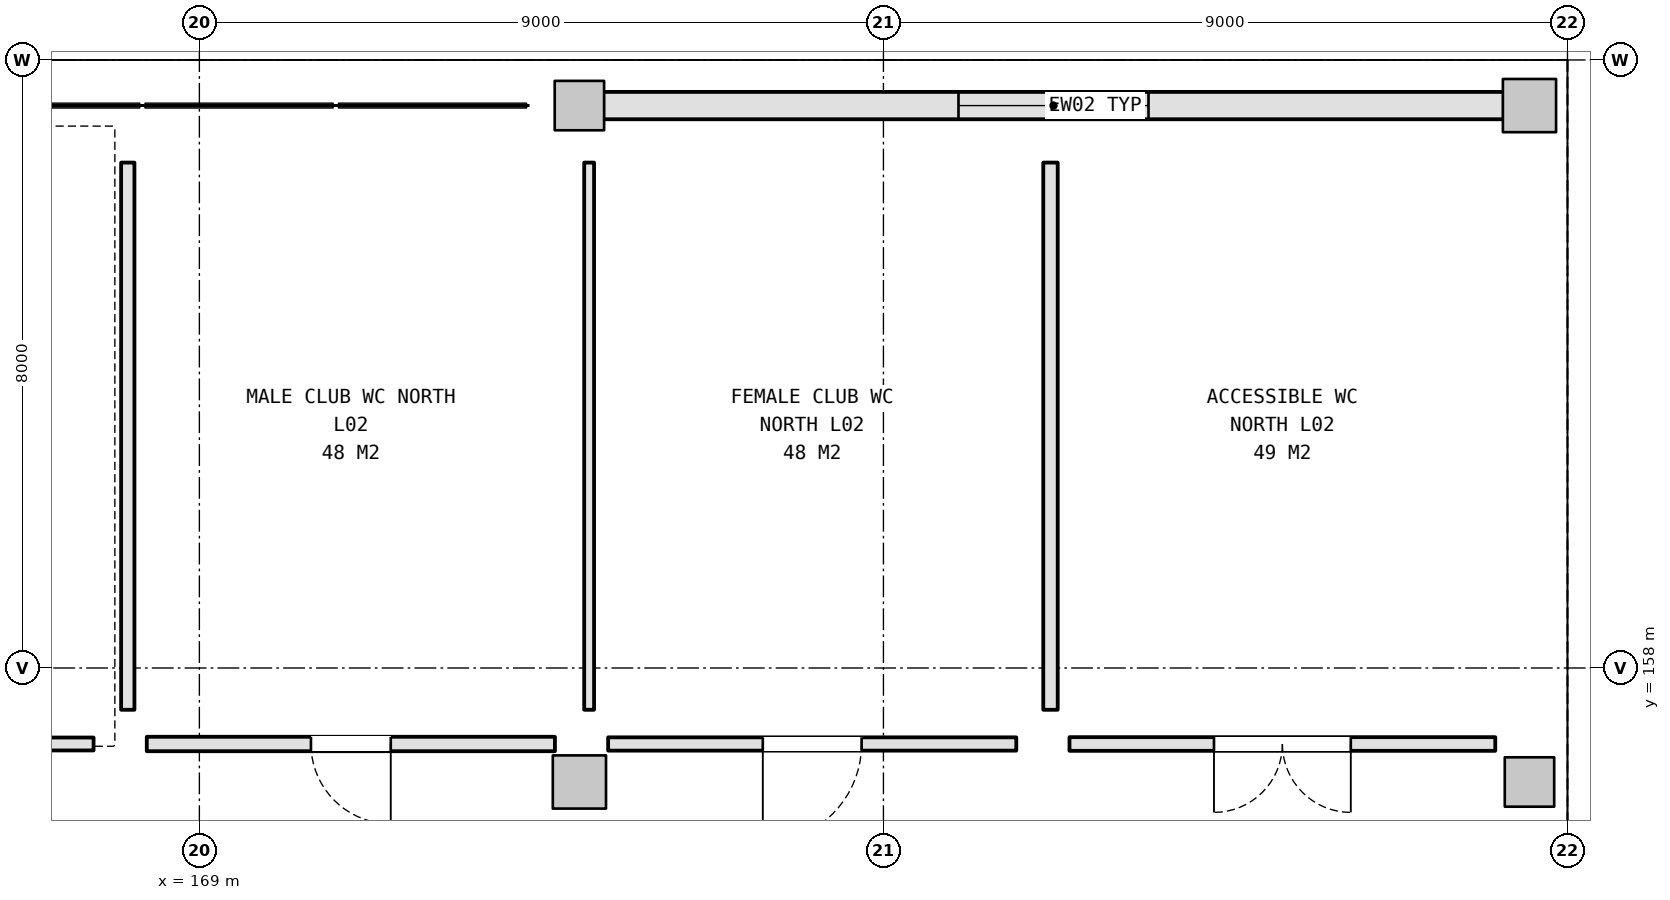
"""IFC4 building model, lengths in metres.
Left out: names, types, materials, properties, quantities, classifications, styles, units other than length and angle.
Written with IfcOpenShell. Run it as: python <this file> out.ifc"""

import sys

from ifc_helpers import new_model, si_unit, direction, frame, frame_2d, origin, origin_2d, place, context, subcontext, project, spatial, rectangle, extrude, element, fill, save


model = new_model("IFC4")
c1 = context("Model", 3, precision=1e-05, world=origin(), true_north=direction((0.0, 1.0)))
c2 = subcontext(c1, "Body", "Model", "MODEL_VIEW")
j1 = project(units=[si_unit("LENGTHUNIT", "METRE"), si_unit("PLANEANGLEUNIT", "RADIAN")], contexts=[c1])
p1 = place(None, origin())
s1 = spatial("IfcSite", under=j1, at=p1, CompositionType="ELEMENT")
p2 = place(p1, origin())
s2 = spatial("IfcBuilding", under=s1, at=p2, CompositionType="ELEMENT")
p3 = place(p2, frame((0.0, 0.0, 10.8)))
s3 = spatial("IfcBuildingStorey", under=s2, at=p3, CompositionType="ELEMENT", Elevation=10.8)
p4 = place(p3, frame((174.0, 156.5, 0.0), z_axis=(0.0, 0.0, 1.0), x_axis=(1.0, 0.0, 0.0)))
e1 = element("IfcColumn", 1, at=p4, inside=s3, PredefinedType="COLUMN", context=c2, shape_type="SweptSolid", body=[
    extrude(rectangle(XDim=0.7, YDim=0.7, at=origin_2d()), origin(), (0.0, 0.0, 1.0), 5.4),
])
for number, where, z_axis, x_axis in (
    (2, (174.0, 165.4, 0.0), (0.0, 0.0, 1.0), (1.0, 0.0, 0.0)),
    (3, (186.5, 156.5, 0.0), (0.0, 0.0, 1.0), (1.0, 0.0, 0.0)),
):
    element("IfcColumn", number, at=place(p3, frame(where, z_axis=z_axis, x_axis=x_axis)), inside=s3, PredefinedType="COLUMN", context=c2, shape_type="SweptSolid", body=[
        extrude(rectangle(XDim=0.65, YDim=0.65, at=origin_2d()), origin(), (0.0, 0.0, 1.0), 5.4),
    ])
p5 = place(p3, frame((186.5, 165.4, 0.0), z_axis=(0.0, 0.0, 1.0), x_axis=(1.0, 0.0, 0.0)))
e4 = element("IfcColumn", 4, at=p5, inside=s3, PredefinedType="COLUMN", context=c2, shape_type="SweptSolid", body=[
    extrude(rectangle(XDim=0.7, YDim=0.7, at=origin_2d()), origin(), (0.0, 0.0, 1.0), 5.4),
])
p6 = place(p3, frame((174.313, 165.4, 0.0), z_axis=(0.0, 0.0, 1.0), x_axis=(1.0, 0.0, 0.0)))
e5 = element("IfcWall", 5, at=p6, inside=s3, PredefinedType="SOLIDWALL", context=c2, shape_type="SweptSolid", body=[
    extrude(rectangle(XDim=11.849, YDim=0.36, at=frame_2d((5.925, 0.0))), origin(), (0.0, 0.0, 1.0), 4.455),
])
p7 = place(p6, frame((4.675, 0.0, 1.05)))
e6 = element("IfcOpeningElement", 6, at=p7, cuts=e5, PredefinedType="OPENING", context=c2, shape_type="SweptSolid", body=[
    extrude(rectangle(XDim=2.5, YDim=2.0, at=frame_2d((1.25, 1.0))), frame((0.0, 0.19, 0.0), z_axis=(0.0, -1.0, 0.0), x_axis=(1.0, 0.0, 0.0)), (0.0, 0.0, 1.0), 0.38),
])
p8 = place(p3, frame((167.608, 157.0, 0.0), z_axis=(0.0, 0.0, 1.0), x_axis=(-1.0, 0.0, 0.0)))
e7 = element("IfcWall", 7, at=p8, inside=s3, PredefinedType="PARTITIONING", context=c2, shape_type="SweptSolid", body=[
    extrude(rectangle(XDim=24.979, YDim=0.17, at=frame_2d((12.49, 0.0))), origin(), (0.0, 0.0, 1.0), 4.505),
])
p9 = place(p8, frame((11.689, 0.0, 0.0)))
e8 = element("IfcOpeningElement", 8, at=p9, cuts=e7, PredefinedType="OPENING", context=c2, shape_type="SweptSolid", body=[
    extrude(rectangle(XDim=1.6, YDim=2.2, at=frame_2d((0.8, 1.1))), frame((0.0, 0.095, 0.0), z_axis=(0.0, -1.0, 0.0), x_axis=(1.0, 0.0, 0.0)), (0.0, 0.0, 1.0), 0.19),
])
p10 = place(p3, frame((173.678, 157.0, 0.0), z_axis=(0.0, 0.0, 1.0), x_axis=(-1.0, 0.0, 0.0)))
e9 = element("IfcWall", 9, at=p10, inside=s3, PredefinedType="PARTITIONING", context=c2, shape_type="SweptSolid", body=[
    extrude(rectangle(XDim=5.37, YDim=0.19, at=frame_2d((2.685, 0.0))), origin(), (0.0, 0.0, 1.0), 4.505),
])
p11 = place(p10, frame((2.16, 0.0, 0.0)))
e10 = element("IfcOpeningElement", 10, at=p11, cuts=e9, PredefinedType="OPENING", context=c2, shape_type="SweptSolid", body=[
    extrude(rectangle(XDim=1.05, YDim=2.2, at=frame_2d((0.525, 1.1))), frame((0.0, 0.105, 0.0), z_axis=(0.0, -1.0, 0.0), x_axis=(1.0, 0.0, 0.0)), (0.0, 0.0, 1.0), 0.21),
])
p12 = place(p3, frame((168.058, 157.45, 0.0), z_axis=(0.0, 0.0, 1.0), x_axis=(0.0, 1.0, 0.0)))
e11 = element("IfcWall", 11, at=p12, inside=s3, PredefinedType="PARTITIONING", context=c2, shape_type="SweptSolid", body=[
    extrude(rectangle(XDim=7.2, YDim=0.175, at=frame_2d((3.6, 0.0))), origin(), (0.0, 0.0, 1.0), 4.655),
])
p13 = place(p3, frame((179.748, 157.0, 0.0), z_axis=(0.0, 0.0, 1.0), x_axis=(-1.0, 0.0, 0.0)))
e12 = element("IfcWall", 12, at=p13, inside=s3, PredefinedType="PARTITIONING", context=c2, shape_type="SweptSolid", body=[
    extrude(rectangle(XDim=5.37, YDim=0.175, at=frame_2d((2.685, 0.0))), origin(), (0.0, 0.0, 1.0), 5.12),
])
p14 = place(p13, frame((2.035, 0.0, 0.0)))
e13 = element("IfcOpeningElement", 13, at=p14, cuts=e12, PredefinedType="OPENING", context=c2, shape_type="SweptSolid", body=[
    extrude(rectangle(XDim=1.3, YDim=2.2, at=frame_2d((0.65, 1.1))), frame((0.0, 0.097, 0.0), z_axis=(0.0, -1.0, 0.0), x_axis=(1.0, 0.0, 0.0)), (0.0, 0.0, 1.0), 0.195),
])
p15 = place(p3, frame((174.128, 157.45, 0.0), z_axis=(0.0, 0.0, 1.0), x_axis=(0.0, 1.0, 0.0)))
e14 = element("IfcWall", 14, at=p15, inside=s3, PredefinedType="PARTITIONING", context=c2, shape_type="SweptSolid", body=[
    extrude(rectangle(XDim=7.2, YDim=0.13, at=frame_2d((3.6, 0.0))), origin(), (0.0, 0.0, 1.0), 4.505),
])
p16 = place(p3, frame((186.05, 157.0, 0.0), z_axis=(0.0, 0.0, 1.0), x_axis=(-1.0, 0.0, 0.0)))
e15 = element("IfcWall", 15, at=p16, inside=s3, PredefinedType="PARTITIONING", context=c2, shape_type="SweptSolid", body=[
    extrude(rectangle(XDim=5.602, YDim=0.18, at=frame_2d((2.801, 0.0))), origin(), (0.0, 0.0, 1.0), 5.12),
])
p17 = place(p16, frame((1.901, 0.0, 0.0)))
e16 = element("IfcOpeningElement", 16, at=p17, cuts=e15, PredefinedType="OPENING", context=c2, shape_type="SweptSolid", body=[
    extrude(rectangle(XDim=1.8, YDim=2.2, at=frame_2d((0.9, 1.1))), frame((0.0, 0.1, 0.0), z_axis=(0.0, -1.0, 0.0), x_axis=(1.0, 0.0, 0.0)), (0.0, 0.0, 1.0), 0.2),
])
p18 = place(p3, frame((180.198, 157.45, 0.0), z_axis=(0.0, 0.0, 1.0), x_axis=(0.0, 1.0, 0.0)))
e17 = element("IfcWall", 17, at=p18, inside=s3, PredefinedType="PARTITIONING", context=c2, shape_type="SweptSolid", body=[
    extrude(rectangle(XDim=7.2, YDim=0.19, at=frame_2d((3.6, 0.0))), origin(), (0.0, 0.0, 1.0), 4.655),
])
p19 = place(p7, origin())
e18 = element("IfcWindow", 18, at=p19, inside=s3, PartitioningType="SINGLE_PANEL", PredefinedType="WINDOW", context=c2, shape_type="SweptSolid", body=[
    extrude(rectangle(XDim=2.5, YDim=2.0, at=frame_2d((1.25, 1.0))), frame((0.0, 0.03, 0.0), z_axis=(0.0, -1.0, 0.0), x_axis=(1.0, 0.0, 0.0)), (0.0, 0.0, 1.0), 0.06),
])
fill(e6, e18)
p20 = place(p11, origin())
e19 = element("IfcDoor", 19, at=p20, inside=s3, OperationType="SINGLE_SWING_LEFT", PredefinedType="DOOR", context=c2, shape_type="SweptSolid", body=[
    extrude(rectangle(XDim=1.05, YDim=2.2, at=frame_2d((0.525, 1.1))), frame((0.0, 0.025, 0.0), z_axis=(0.0, -1.0, 0.0), x_axis=(1.0, 0.0, 0.0)), (0.0, 0.0, 1.0), 0.05),
])
fill(e10, e19)
p21 = place(p14, origin())
e20 = element("IfcDoor", 20, at=p21, inside=s3, OperationType="SINGLE_SWING_RIGHT", PredefinedType="DOOR", context=c2, shape_type="SweptSolid", body=[
    extrude(rectangle(XDim=1.3, YDim=2.2, at=frame_2d((0.65, 1.1))), frame((0.0, 0.025, 0.0), z_axis=(0.0, -1.0, 0.0), x_axis=(1.0, 0.0, 0.0)), (0.0, 0.0, 1.0), 0.05),
])
fill(e13, e20)
p22 = place(p17, origin())
e21 = element("IfcDoor", 21, at=p22, inside=s3, OperationType="DOUBLE_DOOR_SINGLE_SWING", PredefinedType="DOOR", context=c2, shape_type="SweptSolid", body=[
    extrude(rectangle(XDim=1.8, YDim=2.2, at=frame_2d((0.9, 1.1))), frame((0.0, 0.025, 0.0), z_axis=(0.0, -1.0, 0.0), x_axis=(1.0, 0.0, 0.0)), (0.0, 0.0, 1.0), 0.05),
])
fill(e16, e21)
save(model, sys.argv[1])
